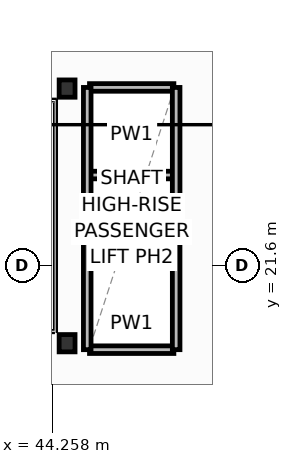
"""IFC4 building model, lengths in metres.
Left out: names, types, materials, properties, quantities, classifications, styles, units other than length and angle.
Written with IfcOpenShell. Run it as: python <this file> out.ifc"""

import sys

from ifc_helpers import new_model, si_unit, direction, frame, frame_2d, origin, origin_2d, place, context, subcontext, project, spatial, rectangle, i_section, extrude, element, save


model = new_model("IFC4")
c1 = context("Model", 3, precision=1e-05, world=origin(), true_north=direction((0.0, 1.0)))
c2 = subcontext(c1, "Body", "Model", "MODEL_VIEW")
j1 = project(units=[si_unit("LENGTHUNIT", "METRE"), si_unit("PLANEANGLEUNIT", "RADIAN")], contexts=[c1])
p1 = place(None, origin())
s1 = spatial("IfcSite", under=j1, at=p1, CompositionType="ELEMENT")
p2 = place(p1, origin())
s2 = spatial("IfcBuilding", under=s1, at=p2, CompositionType="ELEMENT")
p3 = place(p2, frame((0.0, 0.0, 155.0)))
s3 = spatial("IfcBuildingStorey", under=s2, at=p3, CompositionType="ELEMENT", Elevation=155.0)
for number, where, z_axis, x_axis in (
    (1, (44.65, 19.55, 0.0), (0.0, 0.0, 1.0), (1.0, 0.0, 0.0)),
    (2, (44.65, 26.25, 0.0), (0.0, 0.0, 1.0), (1.0, 0.0, 0.0)),
):
    element("IfcColumn", number, at=place(p3, frame(where, z_axis=z_axis, x_axis=x_axis)), inside=s3, PredefinedType="COLUMN", context=c2, shape_type="SweptSolid", body=[
        extrude(i_section(OverallWidth=0.418, OverallDepth=0.455, WebThickness=0.042, FlangeThickness=0.068, FilletRadius=0.025, at=origin_2d()), origin(), (0.0, 0.0, 1.0), 3.7),
    ])
for number, where, z_axis, x_axis in (
    (3, (45.24, 21.675, 0.0), (0.0, 0.0, 1.0), (1.0, 0.0, 0.0)),
    (4, (45.24, 23.975, 0.0), (0.0, 0.0, 1.0), (1.0, 0.0, 0.0)),
):
    element("IfcWall", number, at=place(p3, frame(where, z_axis=z_axis, x_axis=x_axis)), inside=s3, PredefinedType="PARTITIONING", context=c2, shape_type="SweptSolid", body=[
        extrude(rectangle(XDim=2.22, YDim=0.2, at=frame_2d((1.11, 0.0))), origin(), (0.0, 0.0, 1.0), 3.45),
    ])
p4 = place(p3, frame((45.24, 19.38, 0.0), z_axis=(0.0, 0.0, 1.0), x_axis=(1.0, 0.0, 0.0)))
e5 = element("IfcWall", 5, at=p4, inside=s3, PredefinedType="PARTITIONING", context=c2, shape_type="SweptSolid", body=[
    extrude(rectangle(XDim=2.22, YDim=0.2, at=frame_2d((1.11, 0.0))), origin(), (0.0, 0.0, 1.0), 2.662),
])
p5 = place(p3, frame((45.24, 26.28, 0.0), z_axis=(0.0, 0.0, 1.0), x_axis=(1.0, 0.0, 0.0)))
e6 = element("IfcWall", 6, at=p5, inside=s3, PredefinedType="PARTITIONING", context=c2, shape_type="SweptSolid", body=[
    extrude(rectangle(XDim=2.22, YDim=0.2, at=frame_2d((1.11, 0.0))), origin(), (0.0, 0.0, 1.0), 3.45),
])
for number, where, z_axis, x_axis in (
    (7, (45.18, 19.38, 0.0), (0.0, 0.0, 1.0), (0.0, 1.0, 0.0)),
    (8, (47.52, 19.38, 0.0), (0.0, 0.0, 1.0), (0.0, 1.0, 0.0)),
):
    element("IfcWall", number, at=place(p3, frame(where, z_axis=z_axis, x_axis=x_axis)), inside=s3, PredefinedType="PARTITIONING", context=c2, shape_type="SweptSolid", body=[
        extrude(rectangle(XDim=6.9, YDim=0.2, at=frame_2d((3.45, 0.0))), origin(), (0.0, 0.0, 1.0), 3.45),
    ])
save(model, sys.argv[1])
